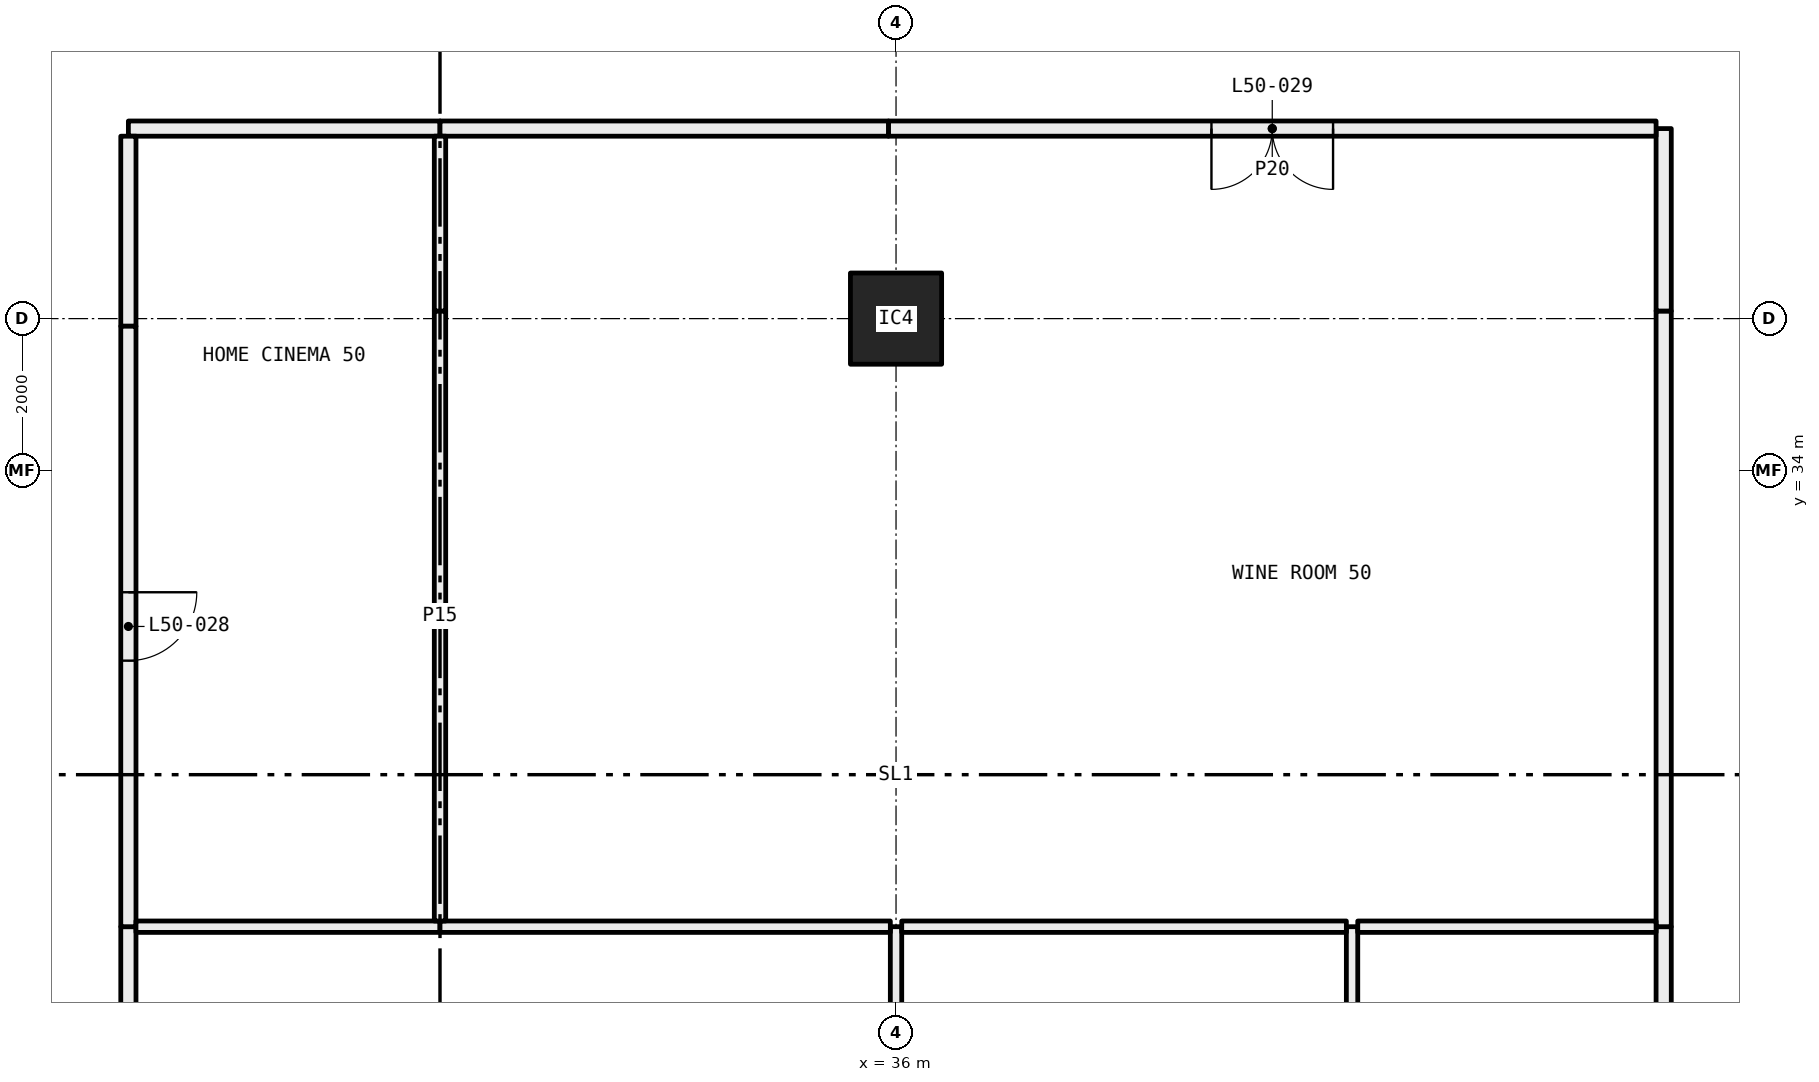
"""IFC4 building model, lengths in metres.
Left out: names, types, materials, properties, quantities, classifications, styles, units other than length and angle.
Written with IfcOpenShell. Run it as: python <this file> out.ifc"""

import sys

from ifc_helpers import new_model, si_unit, direction, frame, frame_2d, origin, origin_2d, place, context, subcontext, project, spatial, rectangle, hollow_rectangle, extrude, element, fill, save


model = new_model("IFC4")
c1 = context("Model", 3, precision=1e-05, world=origin(), true_north=direction((0.0, 1.0)))
c2 = subcontext(c1, "Body", "Model", "MODEL_VIEW")
j1 = project(units=[si_unit("LENGTHUNIT", "METRE"), si_unit("PLANEANGLEUNIT", "RADIAN")], contexts=[c1])
p1 = place(None, origin())
s1 = spatial("IfcSite", under=j1, at=p1, CompositionType="ELEMENT")
p2 = place(p1, origin())
s2 = spatial("IfcBuilding", under=s1, at=p2, CompositionType="ELEMENT")
p3 = place(p2, frame((0.0, 0.0, 189.3)))
s3 = spatial("IfcBuildingStorey", under=s2, at=p3, CompositionType="ELEMENT", Elevation=189.3)
p4 = place(p3, frame((36.0, 36.0, 0.0), z_axis=(0.0, 0.0, 1.0), x_axis=(1.0, 0.0, 0.0)))
e1 = element("IfcColumn", 1, at=p4, inside=s3, PredefinedType="COLUMN", context=c2, shape_type="SweptSolid", body=[
    extrude(hollow_rectangle(XDim=1.2, YDim=1.2, WallThickness=0.05, at=origin_2d()), origin(), (0.0, 0.0, 1.0), 3.05),
])
p5 = place(p3, frame((25.9, 28.0, 0.0), z_axis=(0.0, 0.0, 1.0), x_axis=(0.0, -1.0, 0.0)))
e2 = element("IfcWall", 2, at=p5, inside=s3, PredefinedType="PARTITIONING", context=c2, shape_type="SweptSolid", body=[
    extrude(rectangle(XDim=4.1, YDim=0.2, at=frame_2d((2.05, 0.0))), origin(), (0.0, 0.0, 1.0), 2.45),
])
p6 = place(p3, frame((46.1, 24.1, 0.0), z_axis=(0.0, 0.0, 1.0), x_axis=(0.0, 1.0, 0.0)))
e3 = element("IfcWall", 3, at=p6, inside=s3, PredefinedType="PARTITIONING", context=c2, shape_type="SweptSolid", body=[
    extrude(rectangle(XDim=3.9, YDim=0.2, at=frame_2d((1.95, 0.0))), origin(), (0.0, 0.0, 1.0), 3.05),
])
p7 = place(p3, frame((30.0, 38.5, 0.0), z_axis=(0.0, 0.0, 1.0), x_axis=(-1.0, 0.0, 0.0)))
e4 = element("IfcWall", 4, at=p7, inside=s3, PredefinedType="PARTITIONING", context=c2, shape_type="SweptSolid", body=[
    extrude(rectangle(XDim=4.1, YDim=0.2, at=frame_2d((2.05, 0.0))), origin(), (0.0, 0.0, 1.0), 3.05),
])
p8 = place(p3, frame((25.9, 38.4, 0.0), z_axis=(0.0, 0.0, 1.0), x_axis=(0.0, -1.0, 0.0)))
e5 = element("IfcWall", 5, at=p8, inside=s3, PredefinedType="PARTITIONING", context=c2, shape_type="SweptSolid", body=[
    extrude(rectangle(XDim=2.5, YDim=0.2, at=frame_2d((1.25, 0.0))), origin(), (0.0, 0.0, 1.0), 2.45),
])
p9 = place(p3, frame((25.9, 35.9, 0.0), z_axis=(0.0, 0.0, 1.0), x_axis=(0.0, -1.0, 0.0)))
e6 = element("IfcWall", 6, at=p9, inside=s3, PredefinedType="PARTITIONING", context=c2, shape_type="SweptSolid", body=[
    extrude(rectangle(XDim=7.9, YDim=0.2, at=frame_2d((3.95, 0.0))), origin(), (0.0, 0.0, 1.0), 3.05),
])
p10 = place(p9, frame((3.5, 0.0, 0.0)))
e7 = element("IfcOpeningElement", 7, at=p10, cuts=e6, PredefinedType="OPENING", context=c2, shape_type="SweptSolid", body=[
    extrude(rectangle(XDim=0.9, YDim=2.1, at=frame_2d((0.45, 1.05))), frame((0.0, 0.11, 0.0), z_axis=(0.0, -1.0, 0.0), x_axis=(1.0, 0.0, 0.0)), (0.0, 0.0, 1.0), 0.22),
])
p11 = place(p3, frame((46.1, 28.0, 0.0), z_axis=(0.0, 0.0, 1.0), x_axis=(0.0, 1.0, 0.0)))
e8 = element("IfcWall", 8, at=p11, inside=s3, PredefinedType="PARTITIONING", context=c2, shape_type="SweptSolid", body=[
    extrude(rectangle(XDim=8.1, YDim=0.2, at=frame_2d((4.05, 0.0))), origin(), (0.0, 0.0, 1.0), 2.45),
])
p12 = place(p3, frame((46.1, 36.1, 0.0), z_axis=(0.0, 0.0, 1.0), x_axis=(0.0, 1.0, 0.0)))
e9 = element("IfcWall", 9, at=p12, inside=s3, PredefinedType="PARTITIONING", context=c2, shape_type="SweptSolid", body=[
    extrude(rectangle(XDim=2.4, YDim=0.2, at=frame_2d((1.2, 0.0))), origin(), (0.0, 0.0, 1.0), 3.05),
])
p13 = place(p3, frame((46.0, 38.5, 0.0), z_axis=(0.0, 0.0, 1.0), x_axis=(-1.0, 0.0, 0.0)))
e10 = element("IfcWall", 10, at=p13, inside=s3, PredefinedType="PARTITIONING", context=c2, shape_type="SweptSolid", body=[
    extrude(rectangle(XDim=10.1, YDim=0.2, at=frame_2d((5.05, 0.0))), origin(), (0.0, 0.0, 1.0), 2.45),
])
p14 = place(p13, frame((4.25, 0.0, 0.0)))
e11 = element("IfcOpeningElement", 11, at=p14, cuts=e10, PredefinedType="OPENING", context=c2, shape_type="SweptSolid", body=[
    extrude(rectangle(XDim=1.6, YDim=2.1, at=frame_2d((0.8, 1.05))), frame((0.0, 0.11, 0.0), z_axis=(0.0, -1.0, 0.0), x_axis=(1.0, 0.0, 0.0)), (0.0, 0.0, 1.0), 0.22),
])
p15 = place(p3, frame((35.9, 38.5, 0.0), z_axis=(0.0, 0.0, 1.0), x_axis=(-1.0, 0.0, 0.0)))
e12 = element("IfcWall", 12, at=p15, inside=s3, PredefinedType="PARTITIONING", context=c2, shape_type="SweptSolid", body=[
    extrude(rectangle(XDim=5.9, YDim=0.2, at=frame_2d((2.95, 0.0))), origin(), (0.0, 0.0, 1.0), 3.05),
])
p16 = place(p3, frame((36.0, 24.65, 0.0), z_axis=(0.0, 0.0, 1.0), x_axis=(0.0, 1.0, 0.0)))
e13 = element("IfcWall", 13, at=p16, inside=s3, PredefinedType="PARTITIONING", context=c2, shape_type="SweptSolid", body=[
    extrude(rectangle(XDim=3.35, YDim=0.15, at=frame_2d((1.675, 0.0))), origin(), (0.0, 0.0, 1.0), 2.45),
])
p17 = place(p3, frame((30.0, 28.0, 0.0), z_axis=(0.0, 0.0, 1.0), x_axis=(-1.0, 0.0, 0.0)))
e14 = element("IfcWall", 14, at=p17, inside=s3, PredefinedType="PARTITIONING", context=c2, shape_type="SweptSolid", body=[
    extrude(rectangle(XDim=4.0, YDim=0.15, at=frame_2d((2.0, 0.0))), origin(), (0.0, 0.0, 1.0), 3.05),
])
p18 = place(p3, frame((35.925, 28.0, 0.0), z_axis=(0.0, 0.0, 1.0), x_axis=(-1.0, 0.0, 0.0)))
e15 = element("IfcWall", 15, at=p18, inside=s3, PredefinedType="PARTITIONING", context=c2, shape_type="SweptSolid", body=[
    extrude(rectangle(XDim=5.925, YDim=0.15, at=frame_2d((2.962, 0.0))), origin(), (0.0, 0.0, 1.0), 2.45),
])
p19 = place(p3, frame((42.0, 24.1, 0.0), z_axis=(0.0, 0.0, 1.0), x_axis=(0.0, 1.0, 0.0)))
e16 = element("IfcWall", 16, at=p19, inside=s3, PredefinedType="PARTITIONING", context=c2, shape_type="SweptSolid", body=[
    extrude(rectangle(XDim=3.9, YDim=0.15, at=frame_2d((1.95, 0.0))), origin(), (0.0, 0.0, 1.0), 3.05),
])
p20 = place(p3, frame((41.925, 28.0, 0.0), z_axis=(0.0, 0.0, 1.0), x_axis=(-1.0, 0.0, 0.0)))
e17 = element("IfcWall", 17, at=p20, inside=s3, PredefinedType="PARTITIONING", context=c2, shape_type="SweptSolid", body=[
    extrude(rectangle(XDim=5.85, YDim=0.15, at=frame_2d((2.925, 0.0))), origin(), (0.0, 0.0, 1.0), 2.45),
])
p21 = place(p3, frame((46.0, 28.0, 0.0), z_axis=(0.0, 0.0, 1.0), x_axis=(-1.0, 0.0, 0.0)))
e18 = element("IfcWall", 18, at=p21, inside=s3, PredefinedType="PARTITIONING", context=c2, shape_type="SweptSolid", body=[
    extrude(rectangle(XDim=3.925, YDim=0.15, at=frame_2d((1.962, 0.0))), origin(), (0.0, 0.0, 1.0), 3.05),
])
p22 = place(p3, frame((30.0, 28.075, 0.0), z_axis=(0.0, 0.0, 1.0), x_axis=(0.0, 1.0, 0.0)))
e19 = element("IfcWall", 19, at=p22, inside=s3, PredefinedType="PARTITIONING", context=c2, shape_type="SweptSolid", body=[
    extrude(rectangle(XDim=8.025, YDim=0.15, at=frame_2d((4.013, 0.0))), origin(), (0.0, 0.0, 1.0), 2.45),
])
p23 = place(p3, frame((30.0, 36.1, 0.0), z_axis=(0.0, 0.0, 1.0), x_axis=(0.0, 1.0, 0.0)))
e20 = element("IfcWall", 20, at=p23, inside=s3, PredefinedType="PARTITIONING", context=c2, shape_type="SweptSolid", body=[
    extrude(rectangle(XDim=2.3, YDim=0.15, at=frame_2d((1.15, 0.0))), origin(), (0.0, 0.0, 1.0), 3.05),
])
p24 = place(p10, origin())
e21 = element("IfcDoor", 21, at=p24, inside=s3, OperationType="SINGLE_SWING_RIGHT", PredefinedType="DOOR", context=c2, shape_type="SweptSolid", body=[
    extrude(rectangle(XDim=0.9, YDim=2.1, at=frame_2d((0.45, 1.05))), frame((0.0, 0.025, 0.0), z_axis=(0.0, -1.0, 0.0), x_axis=(1.0, 0.0, 0.0)), (0.0, 0.0, 1.0), 0.05),
])
fill(e7, e21)
p25 = place(p14, origin())
e22 = element("IfcDoor", 22, at=p25, inside=s3, OperationType="DOUBLE_DOOR_SINGLE_SWING", PredefinedType="DOOR", context=c2, shape_type="SweptSolid", body=[
    extrude(rectangle(XDim=1.6, YDim=2.1, at=frame_2d((0.8, 1.05))), frame((0.0, 0.025, 0.0), z_axis=(0.0, -1.0, 0.0), x_axis=(1.0, 0.0, 0.0)), (0.0, 0.0, 1.0), 0.05),
])
fill(e11, e22)
save(model, sys.argv[1])
